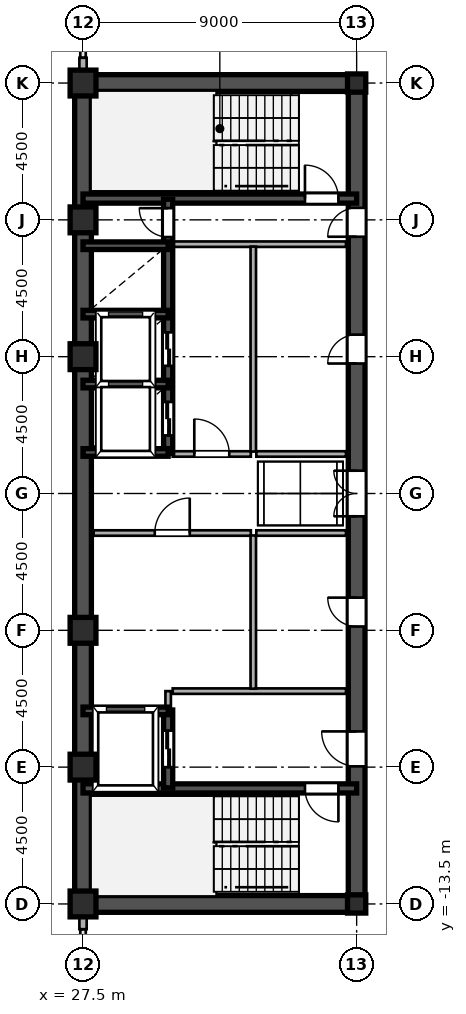
"""IFC4 building model, lengths in metres.
Left out: names, types, materials, properties, quantities, classifications, styles, units other than length and angle.
Written with IfcOpenShell. Run it as: python <this file> out.ifc"""

import sys

from ifc_helpers import new_model, si_unit, direction, frame, frame_2d, origin, origin_2d, place, context, subcontext, project, spatial, rectangle, hollow_rectangle, i_section, extrude, source, transform, mapped, element, fill, save


model = new_model("IFC4")
c1 = context("Model", 3, precision=1e-05, world=origin(), true_north=direction((0.0, 1.0)))
c2 = subcontext(c1, "Body", "Model", "MODEL_VIEW")
j1 = project(units=[si_unit("LENGTHUNIT", "METRE"), si_unit("PLANEANGLEUNIT", "RADIAN")], contexts=[c1])
p1 = place(None, origin())
s1 = spatial("IfcSite", under=j1, at=p1, CompositionType="ELEMENT")
p2 = place(p1, origin())
s2 = spatial("IfcBuilding", under=s1, at=p2, CompositionType="ELEMENT")
p3 = place(p2, frame((0.0, 0.0, 170.7)))
s3 = spatial("IfcBuildingStorey", under=s2, at=p3, CompositionType="ELEMENT", Elevation=170.7)
m1 = source(origin(), c2, "Body", "SweptSolid", [
    extrude(hollow_rectangle(XDim=0.85, YDim=0.85, WallThickness=0.036, at=origin_2d()), origin(), (0.0, 0.0, 1.0), 3.6),
])
for number, where, z_axis, x_axis in (
    (1, (27.5, -13.5, 0.0), (0.0, 0.0, 1.0), (1.0, 0.0, 0.0)),
    (2, (27.5, -9.0, 0.0), (0.0, 0.0, 1.0), (1.0, 0.0, 0.0)),
    (3, (27.5, -4.5, 0.0), (0.0, 0.0, 1.0), (1.0, 0.0, 0.0)),
    (4, (27.5, 4.5, 0.0), (0.0, 0.0, 1.0), (1.0, 0.0, 0.0)),
    (5, (27.5, 9.0, 0.0), (0.0, 0.0, 1.0), (1.0, 0.0, 0.0)),
    (6, (27.5, 13.5, 0.0), (0.0, 0.0, 1.0), (1.0, 0.0, 0.0)),
):
    element("IfcColumn", number, at=place(p3, frame(where, z_axis=z_axis, x_axis=x_axis)), inside=s3, PredefinedType="COLUMN", context=c2, shape_type="MappedRepresentation", body=[
        mapped(m1, transform((0.0, 0.0, 0.0), scale=1.0)),
    ])
m2 = source(origin(), c2, "Body", "SweptSolid", [
    extrude(i_section(OverallWidth=0.6, OverallDepth=0.6, WebThickness=0.025, FlangeThickness=0.04, at=origin_2d()), origin(), (0.0, 0.0, 1.0), 3.6),
])
for number, where, z_axis, x_axis in (
    (7, (36.5, -13.5, 0.0), (0.0, 0.0, 1.0), (1.0, 0.0, 0.0)),
    (8, (36.5, 13.5, 0.0), (0.0, 0.0, 1.0), (1.0, 0.0, 0.0)),
):
    element("IfcColumn", number, at=place(p3, frame(where, z_axis=z_axis, x_axis=x_axis)), inside=s3, PredefinedType="COLUMN", context=c2, shape_type="MappedRepresentation", body=[
        mapped(m2, transform((0.0, 0.0, 0.0), scale=1.0)),
    ])
for number, where, z_axis, x_axis in (
    (9, (27.5, -14.33, 0.0), (0.0, 0.0, 1.0), (0.0, 1.0, 0.0)),
    (10, (27.5, 13.78, 0.0), (0.0, 0.0, 1.0), (0.0, 1.0, 0.0)),
):
    element("IfcWall", number, at=place(p3, frame(where, z_axis=z_axis, x_axis=x_axis)), inside=s3, PredefinedType="SOLIDWALL", context=c2, shape_type="SweptSolid", body=[
        extrude(rectangle(XDim=0.55, YDim=0.24, at=frame_2d((0.275, 0.0))), origin(), (0.0, 0.0, 1.0), 2.88),
    ])
for number, where, z_axis, x_axis in (
    (11, (27.5, -13.5, 0.0), (0.0, 0.0, 1.0), (0.0, 1.0, 0.0)),
    (12, (27.5, 1.3, 0.0), (0.0, 0.0, 1.0), (0.0, 1.0, 0.0)),
):
    element("IfcWall", number, at=place(p3, frame(where, z_axis=z_axis, x_axis=x_axis)), inside=s3, PredefinedType="SHEAR", context=c2, shape_type="SweptSolid", body=[
        extrude(rectangle(XDim=12.2, YDim=0.55, at=frame_2d((6.1, 0.0))), origin(), (0.0, 0.0, 1.0), 3.38),
    ])
p4 = place(p3, frame((27.5, -1.3, 0.0), z_axis=(0.0, 0.0, 1.0), x_axis=(0.0, 1.0, 0.0)))
e13 = element("IfcWall", 13, at=p4, inside=s3, PredefinedType="SHEAR", context=c2, shape_type="SweptSolid", body=[
    extrude(rectangle(XDim=2.6, YDim=0.55, at=frame_2d((1.3, 0.0))), origin(), (0.0, 0.0, 1.0), 3.38),
])
for number, where, z_axis, x_axis in (
    (14, (27.5, -13.5, 0.0), (0.0, 0.0, 1.0), (1.0, 0.0, 0.0)),
    (15, (27.5, 13.5, 0.0), (0.0, 0.0, 1.0), (1.0, 0.0, 0.0)),
):
    element("IfcWall", number, at=place(p3, frame(where, z_axis=z_axis, x_axis=x_axis)), inside=s3, PredefinedType="SHEAR", context=c2, shape_type="SweptSolid", body=[
        extrude(rectangle(XDim=9.0, YDim=0.55, at=frame_2d((4.5, 0.0))), origin(), (0.0, 0.0, 1.0), 3.38),
    ])
p5 = place(p3, frame((36.5, -13.65, 0.0), z_axis=(0.0, 0.0, 1.0), x_axis=(0.0, 1.0, 0.0)))
e16 = element("IfcWall", 16, at=p5, inside=s3, PredefinedType="SHEAR", context=c2, shape_type="SweptSolid", body=[
    extrude(rectangle(XDim=7.15, YDim=0.55, at=frame_2d((3.575, 0.0))), origin(), (0.0, 0.0, 1.0), 3.38),
])
p6 = place(p5, frame((4.675, 0.0, 0.0)))
e17 = element("IfcOpeningElement", 17, at=p6, cuts=e16, PredefinedType="OPENING", context=c2, shape_type="SweptSolid", body=[
    extrude(rectangle(XDim=1.15, YDim=2.2, at=frame_2d((0.575, 1.1))), frame((0.0, 0.285, 0.0), z_axis=(0.0, -1.0, 0.0), x_axis=(1.0, 0.0, 0.0)), (0.0, 0.0, 1.0), 0.57),
])
p7 = place(p3, frame((36.5, -1.3, 0.0), z_axis=(0.0, 0.0, 1.0), x_axis=(0.0, 1.0, 0.0)))
e18 = element("IfcWall", 18, at=p7, inside=s3, PredefinedType="SHEAR", context=c2, shape_type="SweptSolid", body=[
    extrude(rectangle(XDim=2.6, YDim=0.55, at=frame_2d((1.3, 0.0))), origin(), (0.0, 0.0, 1.0), 3.38),
])
p8 = place(p7, frame((0.55, 0.0, 0.0)))
e19 = element("IfcOpeningElement", 19, at=p8, cuts=e18, PredefinedType="OPENING", context=c2, shape_type="SweptSolid", body=[
    extrude(rectangle(XDim=1.5, YDim=2.3, at=frame_2d((0.75, 1.15))), frame((0.0, 0.285, 0.0), z_axis=(0.0, -1.0, 0.0), x_axis=(1.0, 0.0, 0.0)), (0.0, 0.0, 1.0), 0.57),
])
p9 = place(p3, frame((36.5, 8.2, 0.0), z_axis=(0.0, 0.0, 1.0), x_axis=(0.0, 1.0, 0.0)))
e20 = element("IfcWall", 20, at=p9, inside=s3, PredefinedType="SHEAR", context=c2, shape_type="SweptSolid", body=[
    extrude(rectangle(XDim=5.45, YDim=0.55, at=frame_2d((2.725, 0.0))), origin(), (0.0, 0.0, 1.0), 3.38),
])
p10 = place(p9, frame((0.245, 0.0, 0.0)))
e21 = element("IfcOpeningElement", 21, at=p10, cuts=e20, PredefinedType="OPENING", context=c2, shape_type="SweptSolid", body=[
    extrude(rectangle(XDim=0.95, YDim=2.15, at=frame_2d((0.475, 1.075))), frame((0.0, 0.285, 0.0), z_axis=(0.0, -1.0, 0.0), x_axis=(1.0, 0.0, 0.0)), (0.0, 0.0, 1.0), 0.57),
])
p11 = place(p3, frame((36.5, -6.5, 0.0), z_axis=(0.0, 0.0, 1.0), x_axis=(0.0, 1.0, 0.0)))
e22 = element("IfcWall", 22, at=p11, inside=s3, PredefinedType="SHEAR", context=c2, shape_type="SweptSolid", body=[
    extrude(rectangle(XDim=5.2, YDim=0.55, at=frame_2d((2.6, 0.0))), origin(), (0.0, 0.0, 1.0), 3.38),
])
p12 = place(p11, frame((2.125, 0.0, 0.0)))
e23 = element("IfcOpeningElement", 23, at=p12, cuts=e22, PredefinedType="OPENING", context=c2, shape_type="SweptSolid", body=[
    extrude(rectangle(XDim=0.95, YDim=2.15, at=frame_2d((0.475, 1.075))), frame((0.0, 0.285, 0.0), z_axis=(0.0, -1.0, 0.0), x_axis=(1.0, 0.0, 0.0)), (0.0, 0.0, 1.0), 0.57),
])
p13 = place(p3, frame((36.5, 1.3, 0.0), z_axis=(0.0, 0.0, 1.0), x_axis=(0.0, 1.0, 0.0)))
e24 = element("IfcWall", 24, at=p13, inside=s3, PredefinedType="SHEAR", context=c2, shape_type="SweptSolid", body=[
    extrude(rectangle(XDim=6.9, YDim=0.55, at=frame_2d((3.45, 0.0))), origin(), (0.0, 0.0, 1.0), 3.38),
])
p14 = place(p13, frame((2.975, 0.0, 0.0)))
e25 = element("IfcOpeningElement", 25, at=p14, cuts=e24, PredefinedType="OPENING", context=c2, shape_type="SweptSolid", body=[
    extrude(rectangle(XDim=0.95, YDim=2.15, at=frame_2d((0.475, 1.075))), frame((0.0, 0.285, 0.0), z_axis=(0.0, -1.0, 0.0), x_axis=(1.0, 0.0, 0.0)), (0.0, 0.0, 1.0), 0.57),
])
p15 = place(p3, frame((27.5, -9.7, 0.0), z_axis=(0.0, 0.0, 1.0), x_axis=(1.0, 0.0, 0.0)))
e26 = element("IfcWall", 26, at=p15, inside=s3, PredefinedType="SHEAR", context=c2, shape_type="SweptSolid", body=[
    extrude(rectangle(XDim=9.0, YDim=0.3, at=frame_2d((4.5, 0.0))), origin(), (0.0, 0.0, 1.0), 3.38),
])
p16 = place(p15, frame((7.3, 0.0, 0.0)))
e27 = element("IfcOpeningElement", 27, at=p16, cuts=e26, PredefinedType="OPENING", context=c2, shape_type="SweptSolid", body=[
    extrude(rectangle(XDim=1.1, YDim=2.2, at=frame_2d((0.55, 1.1))), frame((0.0, 0.16, 0.0), z_axis=(0.0, -1.0, 0.0), x_axis=(1.0, 0.0, 0.0)), (0.0, 0.0, 1.0), 0.32),
])
p17 = place(p3, frame((27.5, 9.7, 0.0), z_axis=(0.0, 0.0, 1.0), x_axis=(1.0, 0.0, 0.0)))
e28 = element("IfcWall", 28, at=p17, inside=s3, PredefinedType="SHEAR", context=c2, shape_type="SweptSolid", body=[
    extrude(rectangle(XDim=9.0, YDim=0.3, at=frame_2d((4.5, 0.0))), origin(), (0.0, 0.0, 1.0), 3.38),
])
p18 = place(p17, frame((7.3, 0.0, 0.0)))
e29 = element("IfcOpeningElement", 29, at=p18, cuts=e28, PredefinedType="OPENING", context=c2, shape_type="SweptSolid", body=[
    extrude(rectangle(XDim=1.1, YDim=2.2, at=frame_2d((0.55, 1.1))), frame((0.0, 0.16, 0.0), z_axis=(0.0, -1.0, 0.0), x_axis=(1.0, 0.0, 0.0)), (0.0, 0.0, 1.0), 0.32),
])
for number, where, z_axis, x_axis in (
    (30, (27.5, -7.15, 0.0), (0.0, 0.0, 1.0), (1.0, 0.0, 0.0)),
    (31, (27.5, 1.35, 0.0), (0.0, 0.0, 1.0), (1.0, 0.0, 0.0)),
    (32, (27.5, 3.6, 0.0), (0.0, 0.0, 1.0), (1.0, 0.0, 0.0)),
    (33, (27.5, 5.9, 0.0), (0.0, 0.0, 1.0), (1.0, 0.0, 0.0)),
    (34, (27.5, 8.15, 0.0), (0.0, 0.0, 1.0), (1.0, 0.0, 0.0)),
):
    element("IfcWall", number, at=place(p3, frame(where, z_axis=z_axis, x_axis=x_axis)), inside=s3, PredefinedType="SHEAR", context=c2, shape_type="SweptSolid", body=[
        extrude(rectangle(XDim=2.8, YDim=0.25, at=frame_2d((1.4, 0.0))), origin(), (0.0, 0.0, 1.0), 3.38),
    ])
p19 = place(p3, frame((30.3, -9.68, 0.0), z_axis=(0.0, 0.0, 1.0), x_axis=(0.0, 1.0, 0.0)))
e35 = element("IfcWall", 35, at=p19, inside=s3, PredefinedType="SHEAR", context=c2, shape_type="SweptSolid", body=[
    extrude(rectangle(XDim=2.56, YDim=0.3, at=frame_2d((1.28, 0.0))), origin(), (0.0, 0.0, 1.0), 3.38),
])
p20 = place(p19, frame((0.68, 0.0, 0.0)))
e36 = element("IfcOpeningElement", 36, at=p20, cuts=e35, PredefinedType="OPENING", context=c2, shape_type="SweptSolid", body=[
    extrude(rectangle(XDim=1.2, YDim=2.25, at=frame_2d((0.6, 1.125))), frame((0.0, 0.16, 0.0), z_axis=(0.0, -1.0, 0.0), x_axis=(1.0, 0.0, 0.0)), (0.0, 0.0, 1.0), 0.32),
])
p21 = place(p3, frame((30.3, 1.32, 0.0), z_axis=(0.0, 0.0, 1.0), x_axis=(0.0, 1.0, 0.0)))
e37 = element("IfcWall", 37, at=p21, inside=s3, PredefinedType="SHEAR", context=c2, shape_type="SweptSolid", body=[
    extrude(rectangle(XDim=2.28, YDim=0.3, at=frame_2d((1.14, 0.0))), origin(), (0.0, 0.0, 1.0), 3.38),
])
p22 = place(p21, frame((0.59, 0.0, 0.0)))
e38 = element("IfcOpeningElement", 38, at=p22, cuts=e37, PredefinedType="OPENING", context=c2, shape_type="SweptSolid", body=[
    extrude(rectangle(XDim=1.1, YDim=2.2, at=frame_2d((0.55, 1.1))), frame((0.0, 0.16, 0.0), z_axis=(0.0, -1.0, 0.0), x_axis=(1.0, 0.0, 0.0)), (0.0, 0.0, 1.0), 0.32),
])
p23 = place(p3, frame((30.3, 3.6, 0.0), z_axis=(0.0, 0.0, 1.0), x_axis=(0.0, 1.0, 0.0)))
e39 = element("IfcWall", 39, at=p23, inside=s3, PredefinedType="SHEAR", context=c2, shape_type="SweptSolid", body=[
    extrude(rectangle(XDim=2.3, YDim=0.3, at=frame_2d((1.15, 0.0))), origin(), (0.0, 0.0, 1.0), 3.38),
])
p24 = place(p23, frame((0.6, 0.0, 0.0)))
e40 = element("IfcOpeningElement", 40, at=p24, cuts=e39, PredefinedType="OPENING", context=c2, shape_type="SweptSolid", body=[
    extrude(rectangle(XDim=1.1, YDim=2.2, at=frame_2d((0.55, 1.1))), frame((0.0, 0.16, 0.0), z_axis=(0.0, -1.0, 0.0), x_axis=(1.0, 0.0, 0.0)), (0.0, 0.0, 1.0), 0.32),
])
p25 = place(p3, frame((30.3, 5.9, 0.0), z_axis=(0.0, 0.0, 1.0), x_axis=(0.0, 1.0, 0.0)))
e41 = element("IfcWall", 41, at=p25, inside=s3, PredefinedType="SHEAR", context=c2, shape_type="SweptSolid", body=[
    extrude(rectangle(XDim=2.25, YDim=0.3, at=frame_2d((1.125, 0.0))), origin(), (0.0, 0.0, 1.0), 3.38),
])
p26 = place(p3, frame((30.3, 8.15, 0.0), z_axis=(0.0, 0.0, 1.0), x_axis=(0.0, 1.0, 0.0)))
e42 = element("IfcWall", 42, at=p26, inside=s3, PredefinedType="SHEAR", context=c2, shape_type="SweptSolid", body=[
    extrude(rectangle(XDim=1.53, YDim=0.3, at=frame_2d((0.765, 0.0))), origin(), (0.0, 0.0, 1.0), 3.38),
])
p27 = place(p26, frame((0.285, 0.0, 0.0)))
e43 = element("IfcOpeningElement", 43, at=p27, cuts=e42, PredefinedType="OPENING", context=c2, shape_type="SweptSolid", body=[
    extrude(rectangle(XDim=0.95, YDim=2.15, at=frame_2d((0.475, 1.075))), frame((0.0, 0.16, 0.0), z_axis=(0.0, -1.0, 0.0), x_axis=(1.0, 0.0, 0.0)), (0.0, 0.0, 1.0), 0.32),
])
p28 = place(p3, frame((30.45, -6.5, 0.0), z_axis=(0.0, 0.0, 1.0), x_axis=(1.0, 0.0, 0.0)))
e44 = element("IfcWall", 44, at=p28, inside=s3, PredefinedType="PARTITIONING", context=c2, shape_type="SweptSolid", body=[
    extrude(rectangle(XDim=5.7, YDim=0.18, at=frame_2d((2.85, 0.0))), origin(), (0.0, 0.0, 1.0), 3.38),
])
p29 = place(p3, frame((30.3, -7.12, 0.0), z_axis=(0.0, 0.0, 1.0), x_axis=(0.0, 1.0, 0.0)))
e45 = element("IfcWall", 45, at=p29, inside=s3, PredefinedType="PARTITIONING", context=c2, shape_type="SweptSolid", body=[
    extrude(rectangle(XDim=0.62, YDim=0.18, at=frame_2d((0.31, 0.0))), origin(), (0.0, 0.0, 1.0), 3.38),
])
p30 = place(p3, frame((30.45, 8.2, 0.0), z_axis=(0.0, 0.0, 1.0), x_axis=(1.0, 0.0, 0.0)))
e46 = element("IfcWall", 46, at=p30, inside=s3, PredefinedType="PARTITIONING", context=c2, shape_type="SweptSolid", body=[
    extrude(rectangle(XDim=5.7, YDim=0.18, at=frame_2d((2.85, 0.0))), origin(), (0.0, 0.0, 1.0), 3.38),
])
p31 = place(p3, frame((33.1, -6.42, 0.0), z_axis=(0.0, 0.0, 1.0), x_axis=(0.0, 1.0, 0.0)))
e47 = element("IfcWall", 47, at=p31, inside=s3, PredefinedType="PARTITIONING", context=c2, shape_type="SweptSolid", body=[
    extrude(rectangle(XDim=5.04, YDim=0.18, at=frame_2d((2.52, 0.0))), origin(), (0.0, 0.0, 1.0), 3.38),
])
p32 = place(p3, frame((33.1, 1.38, 0.0), z_axis=(0.0, 0.0, 1.0), x_axis=(0.0, 1.0, 0.0)))
e48 = element("IfcWall", 48, at=p32, inside=s3, PredefinedType="PARTITIONING", context=c2, shape_type="SweptSolid", body=[
    extrude(rectangle(XDim=6.74, YDim=0.18, at=frame_2d((3.37, 0.0))), origin(), (0.0, 0.0, 1.0), 3.38),
])
p33 = place(p3, frame((27.85, -1.3, 0.0), z_axis=(0.0, 0.0, 1.0), x_axis=(1.0, 0.0, 0.0)))
e49 = element("IfcWall", 49, at=p33, inside=s3, PredefinedType="PARTITIONING", context=c2, shape_type="SweptSolid", body=[
    extrude(rectangle(XDim=5.17, YDim=0.18, at=frame_2d((2.585, 0.0))), origin(), (0.0, 0.0, 1.0), 3.38),
])
p34 = place(p33, frame((2.01, 0.0, 0.0)))
e50 = element("IfcOpeningElement", 50, at=p34, cuts=e49, PredefinedType="OPENING", context=c2, shape_type="SweptSolid", body=[
    extrude(rectangle(XDim=1.15, YDim=2.2, at=frame_2d((0.575, 1.1))), frame((0.0, 0.1, 0.0), z_axis=(0.0, -1.0, 0.0), x_axis=(1.0, 0.0, 0.0)), (0.0, 0.0, 1.0), 0.2),
])
p35 = place(p3, frame((30.45, 1.3, 0.0), z_axis=(0.0, 0.0, 1.0), x_axis=(1.0, 0.0, 0.0)))
e51 = element("IfcWall", 51, at=p35, inside=s3, PredefinedType="PARTITIONING", context=c2, shape_type="SweptSolid", body=[
    extrude(rectangle(XDim=2.57, YDim=0.18, at=frame_2d((1.285, 0.0))), origin(), (0.0, 0.0, 1.0), 3.38),
])
p36 = place(p35, frame((0.71, 0.0, 0.0)))
e52 = element("IfcOpeningElement", 52, at=p36, cuts=e51, PredefinedType="OPENING", context=c2, shape_type="SweptSolid", body=[
    extrude(rectangle(XDim=1.15, YDim=2.2, at=frame_2d((0.575, 1.1))), frame((0.0, 0.1, 0.0), z_axis=(0.0, -1.0, 0.0), x_axis=(1.0, 0.0, 0.0)), (0.0, 0.0, 1.0), 0.2),
])
for number, where, z_axis, x_axis in (
    (53, (33.2, -1.3, 0.0), (0.0, 0.0, 1.0), (1.0, 0.0, 0.0)),
    (54, (33.2, 1.3, 0.0), (0.0, 0.0, 1.0), (1.0, 0.0, 0.0)),
):
    element("IfcWall", number, at=place(p3, frame(where, z_axis=z_axis, x_axis=x_axis)), inside=s3, PredefinedType="PARTITIONING", context=c2, shape_type="SweptSolid", body=[
        extrude(rectangle(XDim=2.95, YDim=0.18, at=frame_2d((1.475, 0.0))), origin(), (0.0, 0.0, 1.0), 3.38),
    ])
m3 = source(origin(), c2, "Body", "SweptSolid", [
    extrude(rectangle(XDim=1.15, YDim=2.2, at=frame_2d((0.575, 1.1))), frame((0.0, 0.025, 0.0), z_axis=(0.0, -1.0, 0.0), x_axis=(1.0, 0.0, 0.0)), (0.0, 0.0, 1.0), 0.05),
])
p37 = place(p6, origin())
e55 = element("IfcDoor", 55, at=p37, inside=s3, OperationType="SINGLE_SWING_RIGHT", PredefinedType="DOOR", context=c2, shape_type="MappedRepresentation", body=[
    mapped(m3, transform((0.0, 0.0, 0.0), scale=1.0)),
])
fill(e17, e55)
m4 = source(origin(), c2, "Body", "SweptSolid", [
    extrude(rectangle(XDim=1.5, YDim=2.3, at=frame_2d((0.75, 1.15))), frame((0.0, 0.025, 0.0), z_axis=(0.0, -1.0, 0.0), x_axis=(1.0, 0.0, 0.0)), (0.0, 0.0, 1.0), 0.05),
])
p38 = place(p8, origin())
e56 = element("IfcDoor", 56, at=p38, inside=s3, OperationType="DOUBLE_SWING_LEFT", PredefinedType="DOOR", context=c2, shape_type="MappedRepresentation", body=[
    mapped(m4, transform((0.0, 0.0, 0.0), scale=1.0)),
])
fill(e19, e56)
m5 = source(origin(), c2, "Body", "SweptSolid", [
    extrude(rectangle(XDim=0.95, YDim=2.15, at=frame_2d((0.475, 1.075))), frame((0.0, 0.025, 0.0), z_axis=(0.0, -1.0, 0.0), x_axis=(1.0, 0.0, 0.0)), (0.0, 0.0, 1.0), 0.05),
])
p39 = place(p10, origin())
e57 = element("IfcDoor", 57, at=p39, inside=s3, OperationType="SINGLE_SWING_LEFT", PredefinedType="DOOR", context=c2, shape_type="MappedRepresentation", body=[
    mapped(m5, transform((0.0, 0.0, 0.0), scale=1.0)),
])
fill(e21, e57)
p40 = place(p12, origin())
e58 = element("IfcDoor", 58, at=p40, inside=s3, OperationType="SINGLE_SWING_RIGHT", PredefinedType="DOOR", context=c2, shape_type="MappedRepresentation", body=[
    mapped(m5, transform((0.0, 0.0, 0.0), scale=1.0)),
])
fill(e23, e58)
p41 = place(p14, origin())
e59 = element("IfcDoor", 59, at=p41, inside=s3, OperationType="SINGLE_SWING_LEFT", PredefinedType="DOOR", context=c2, shape_type="MappedRepresentation", body=[
    mapped(m5, transform((0.0, 0.0, 0.0), scale=1.0)),
])
fill(e25, e59)
m6 = source(origin(), c2, "Body", "SweptSolid", [
    extrude(rectangle(XDim=1.1, YDim=2.2, at=frame_2d((0.55, 1.1))), frame((0.0, 0.025, 0.0), z_axis=(0.0, -1.0, 0.0), x_axis=(1.0, 0.0, 0.0)), (0.0, 0.0, 1.0), 0.05),
])
p42 = place(p16, frame((1.1, 0.0, 0.0), z_axis=(0.0, 0.0, 1.0), x_axis=(-1.0, 0.0, 0.0)))
e60 = element("IfcDoor", 60, at=p42, inside=s3, OperationType="SINGLE_SWING_RIGHT", PredefinedType="DOOR", context=c2, shape_type="MappedRepresentation", body=[
    mapped(m6, transform((0.0, 0.0, 0.0), scale=1.0)),
])
fill(e27, e60)
p43 = place(p18, origin())
e61 = element("IfcDoor", 61, at=p43, inside=s3, OperationType="SINGLE_SWING_LEFT", PredefinedType="DOOR", context=c2, shape_type="MappedRepresentation", body=[
    mapped(m6, transform((0.0, 0.0, 0.0), scale=1.0)),
])
fill(e29, e61)
m7 = source(origin(), c2, "Body", "SweptSolid", [
    extrude(rectangle(XDim=1.2, YDim=2.25, at=frame_2d((0.6, 1.125))), frame((0.0, 0.025, 0.0), z_axis=(0.0, -1.0, 0.0), x_axis=(1.0, 0.0, 0.0)), (0.0, 0.0, 1.0), 0.05),
])
p44 = place(p20, origin())
e62 = element("IfcDoor", 62, at=p44, inside=s3, OperationType="DOUBLE_DOOR_SLIDING", PredefinedType="DOOR", context=c2, shape_type="MappedRepresentation", body=[
    mapped(m7, transform((0.0, 0.0, 0.0), scale=1.0)),
])
fill(e36, e62)
m8 = source(origin(), c2, "Body", "SweptSolid", [
    extrude(rectangle(XDim=1.1, YDim=2.2, at=frame_2d((0.55, 1.1))), frame((0.0, 0.025, 0.0), z_axis=(0.0, -1.0, 0.0), x_axis=(1.0, 0.0, 0.0)), (0.0, 0.0, 1.0), 0.05),
])
p45 = place(p22, origin())
e63 = element("IfcDoor", 63, at=p45, inside=s3, OperationType="DOUBLE_DOOR_SLIDING", PredefinedType="DOOR", context=c2, shape_type="MappedRepresentation", body=[
    mapped(m8, transform((0.0, 0.0, 0.0), scale=1.0)),
])
fill(e38, e63)
p46 = place(p24, origin())
e64 = element("IfcDoor", 64, at=p46, inside=s3, OperationType="DOUBLE_DOOR_SLIDING", PredefinedType="DOOR", context=c2, shape_type="MappedRepresentation", body=[
    mapped(m8, transform((0.0, 0.0, 0.0), scale=1.0)),
])
fill(e40, e64)
p47 = place(p27, origin())
e65 = element("IfcDoor", 65, at=p47, inside=s3, OperationType="SINGLE_SWING_RIGHT", PredefinedType="DOOR", context=c2, shape_type="MappedRepresentation", body=[
    mapped(m5, transform((0.0, 0.0, 0.0), scale=1.0)),
])
fill(e43, e65)
p48 = place(p34, origin())
e66 = element("IfcDoor", 66, at=p48, inside=s3, OperationType="SINGLE_SWING_RIGHT", PredefinedType="DOOR", context=c2, shape_type="MappedRepresentation", body=[
    mapped(m3, transform((0.0, 0.0, 0.0), scale=1.0)),
])
fill(e50, e66)
p49 = place(p36, origin())
e67 = element("IfcDoor", 67, at=p49, inside=s3, OperationType="SINGLE_SWING_LEFT", PredefinedType="DOOR", context=c2, shape_type="MappedRepresentation", body=[
    mapped(m3, transform((0.0, 0.0, 0.0), scale=1.0)),
])
fill(e52, e67)
save(model, sys.argv[1])
